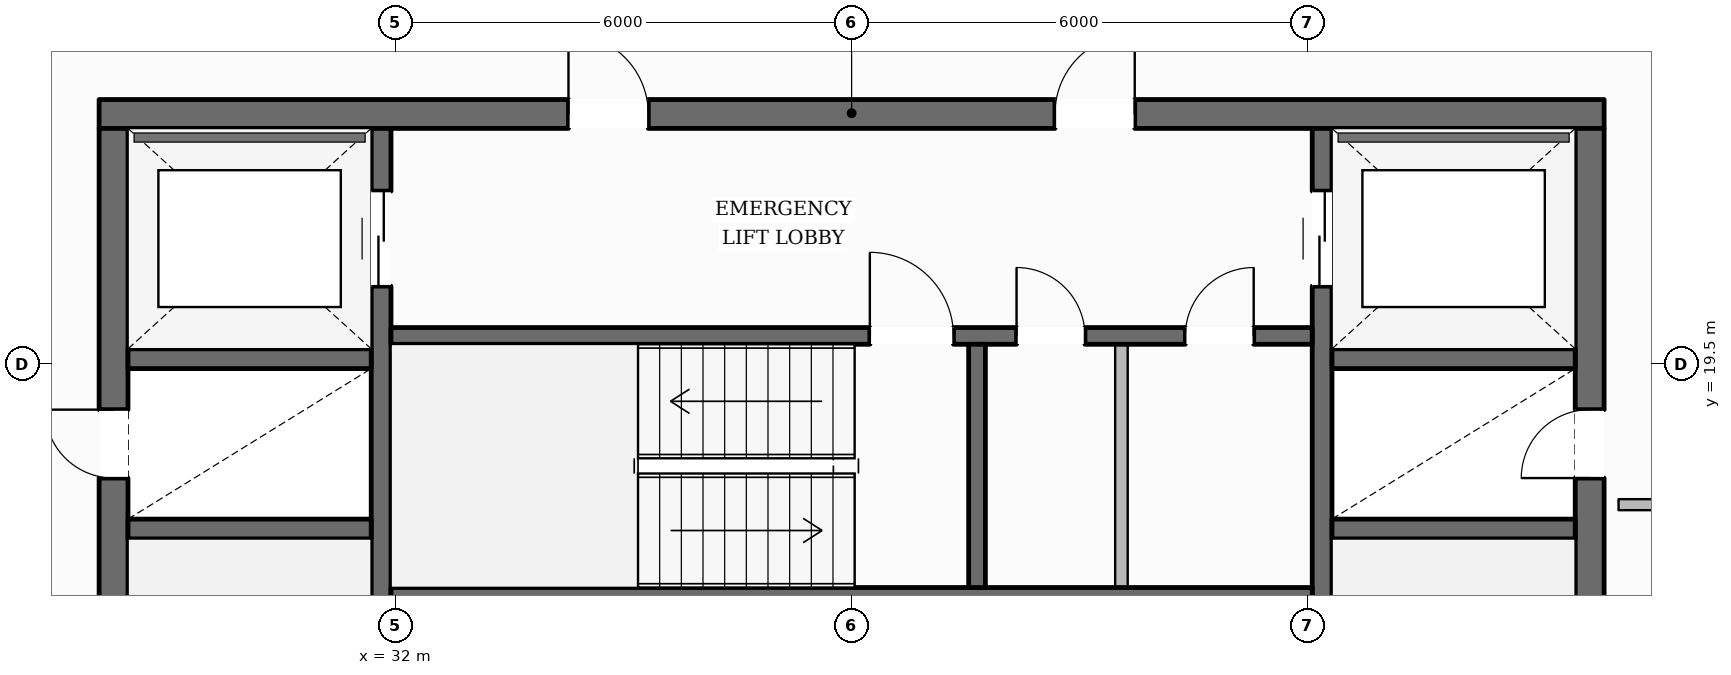
"""IFC4 building model, lengths in metres.
Left out: names, types, materials, properties, quantities, classifications, styles, units other than length and angle.
Written with IfcOpenShell. Run it as: python <this file> out.ifc"""

import sys

from ifc_helpers import new_model, si_unit, direction, frame, frame_2d, origin, place, context, subcontext, project, spatial, rectangle, extrude, element, fill, save


model = new_model("IFC4")
c1 = context("Model", 3, precision=1e-05, world=origin(), true_north=direction((0.0, 1.0)))
c2 = subcontext(c1, "Body", "Model", "MODEL_VIEW")
j1 = project(units=[si_unit("LENGTHUNIT", "METRE"), si_unit("PLANEANGLEUNIT", "RADIAN")], contexts=[c1])
p1 = place(None, origin())
s1 = spatial("IfcSite", under=j1, at=p1, CompositionType="ELEMENT")
p2 = place(p1, origin())
s2 = spatial("IfcBuilding", under=s1, at=p2, CompositionType="ELEMENT")
p3 = place(p2, frame((0.0, 0.0, 289.55)))
s3 = spatial("IfcBuildingStorey", under=s2, at=p3, CompositionType="ELEMENT", Elevation=289.55)
p4 = place(p3, frame((28.1, 22.79, 0.0), z_axis=(0.0, 0.0, 1.0), x_axis=(1.0, 0.0, 0.0)))
e1 = element("IfcWall", 1, at=p4, inside=s3, PredefinedType="SOLIDWALL", context=c2, shape_type="SweptSolid", body=[
    extrude(rectangle(XDim=19.8, YDim=0.38, at=frame_2d((9.9, 0.0))), origin(), (0.0, 0.0, 1.0), 3.61),
])
p5 = place(p4, frame((6.175, 0.0, 0.0)))
e2 = element("IfcOpeningElement", 2, at=p5, cuts=e1, PredefinedType="OPENING", context=c2, shape_type="SweptSolid", body=[
    extrude(rectangle(XDim=1.05, YDim=2.15, at=frame_2d((0.525, 1.075))), frame((0.0, 0.2, 0.0), z_axis=(0.0, -1.0, 0.0), x_axis=(1.0, 0.0, 0.0)), (0.0, 0.0, 1.0), 0.4),
])
p6 = place(p4, frame((12.575, 0.0, 0.0)))
e3 = element("IfcOpeningElement", 3, at=p6, cuts=e1, PredefinedType="OPENING", context=c2, shape_type="SweptSolid", body=[
    extrude(rectangle(XDim=1.05, YDim=2.15, at=frame_2d((0.525, 1.075))), frame((0.0, 0.2, 0.0), z_axis=(0.0, -1.0, 0.0), x_axis=(1.0, 0.0, 0.0)), (0.0, 0.0, 1.0), 0.4),
])
p7 = place(p3, frame((28.29, 9.6, 0.0), z_axis=(0.0, 0.0, 1.0), x_axis=(0.0, 1.0, 0.0)))
e4 = element("IfcWall", 4, at=p7, inside=s3, PredefinedType="SOLIDWALL", context=c2, shape_type="SweptSolid", body=[
    extrude(rectangle(XDim=13.0, YDim=0.38, at=frame_2d((6.5, 0.0))), origin(), (0.0, 0.0, 1.0), 3.61),
])
p8 = place(p7, frame((0.2, 0.0, 0.0)))
e5 = element("IfcOpeningElement", 5, at=p8, cuts=e4, PredefinedType="OPENING", context=c2, shape_type="SweptSolid", body=[
    extrude(rectangle(XDim=1.1, YDim=2.15, at=frame_2d((0.55, 1.075))), frame((0.0, 0.2, 0.0), z_axis=(0.0, -1.0, 0.0), x_axis=(1.0, 0.0, 0.0)), (0.0, 0.0, 1.0), 0.4),
])
p9 = place(p7, frame((8.4, 0.0, 0.0)))
e6 = element("IfcOpeningElement", 6, at=p9, cuts=e4, PredefinedType="OPENING", context=c2, shape_type="SweptSolid", body=[
    extrude(rectangle(XDim=0.9, YDim=2.1, at=frame_2d((0.45, 1.05))), frame((0.0, 0.2, 0.0), z_axis=(0.0, -1.0, 0.0), x_axis=(1.0, 0.0, 0.0)), (0.0, 0.0, 1.0), 0.4),
])
p10 = place(p3, frame((47.71, 9.6, 0.0), z_axis=(0.0, 0.0, 1.0), x_axis=(0.0, 1.0, 0.0)))
e7 = element("IfcWall", 7, at=p10, inside=s3, PredefinedType="SOLIDWALL", context=c2, shape_type="SweptSolid", body=[
    extrude(rectangle(XDim=13.0, YDim=0.38, at=frame_2d((6.5, 0.0))), origin(), (0.0, 0.0, 1.0), 3.61),
])
p11 = place(p10, frame((0.2, 0.0, 0.0)))
e8 = element("IfcOpeningElement", 8, at=p11, cuts=e7, PredefinedType="OPENING", context=c2, shape_type="SweptSolid", body=[
    extrude(rectangle(XDim=1.1, YDim=2.15, at=frame_2d((0.55, 1.075))), frame((0.0, 0.2, 0.0), z_axis=(0.0, -1.0, 0.0), x_axis=(1.0, 0.0, 0.0)), (0.0, 0.0, 1.0), 0.4),
])
p12 = place(p10, frame((8.4, 0.0, 0.0)))
e9 = element("IfcOpeningElement", 9, at=p12, cuts=e7, PredefinedType="OPENING", context=c2, shape_type="SweptSolid", body=[
    extrude(rectangle(XDim=0.9, YDim=2.1, at=frame_2d((0.45, 1.05))), frame((0.0, 0.2, 0.0), z_axis=(0.0, -1.0, 0.0), x_axis=(1.0, 0.0, 0.0)), (0.0, 0.0, 1.0), 0.4),
])
p13 = place(p3, frame((31.81, 9.6, 0.0), z_axis=(0.0, 0.0, 1.0), x_axis=(0.0, 1.0, 0.0)))
e10 = element("IfcWall", 10, at=p13, inside=s3, PredefinedType="SHEAR", context=c2, shape_type="SweptSolid", body=[
    extrude(rectangle(XDim=13.0, YDim=0.26, at=frame_2d((6.5, 0.0))), origin(), (0.0, 0.0, 1.0), 3.61),
])
p14 = place(p13, frame((10.925, 0.0, 0.0)))
e11 = element("IfcOpeningElement", 11, at=p14, cuts=e10, PredefinedType="OPENING", context=c2, shape_type="SweptSolid", body=[
    extrude(rectangle(XDim=1.25, YDim=2.25, at=frame_2d((0.625, 1.125))), frame((0.0, 0.14, 0.0), z_axis=(0.0, -1.0, 0.0), x_axis=(1.0, 0.0, 0.0)), (0.0, 0.0, 1.0), 0.28),
])
p15 = place(p3, frame((44.19, 9.6, 0.0), z_axis=(0.0, 0.0, 1.0), x_axis=(0.0, 1.0, 0.0)))
e12 = element("IfcWall", 12, at=p15, inside=s3, PredefinedType="SHEAR", context=c2, shape_type="SweptSolid", body=[
    extrude(rectangle(XDim=13.0, YDim=0.26, at=frame_2d((6.5, 0.0))), origin(), (0.0, 0.0, 1.0), 3.61),
])
p16 = place(p15, frame((10.925, 0.0, 0.0)))
e13 = element("IfcOpeningElement", 13, at=p16, cuts=e12, PredefinedType="OPENING", context=c2, shape_type="SweptSolid", body=[
    extrude(rectangle(XDim=1.25, YDim=2.25, at=frame_2d((0.625, 1.125))), frame((0.0, 0.14, 0.0), z_axis=(0.0, -1.0, 0.0), x_axis=(1.0, 0.0, 0.0)), (0.0, 0.0, 1.0), 0.28),
])
for number, where, z_axis, x_axis in (
    (14, (28.48, 17.33, 0.0), (0.0, 0.0, 1.0), (1.0, 0.0, 0.0)),
    (15, (28.48, 19.57, 0.0), (0.0, 0.0, 1.0), (1.0, 0.0, 0.0)),
    (16, (44.32, 17.33, 0.0), (0.0, 0.0, 1.0), (1.0, 0.0, 0.0)),
    (17, (44.32, 19.57, 0.0), (0.0, 0.0, 1.0), (1.0, 0.0, 0.0)),
):
    element("IfcWall", number, at=place(p3, frame(where, z_axis=z_axis, x_axis=x_axis)), inside=s3, PredefinedType="SHEAR", context=c2, shape_type="SweptSolid", body=[
        extrude(rectangle(XDim=3.2, YDim=0.26, at=frame_2d((1.6, 0.0))), origin(), (0.0, 0.0, 1.0), 3.61),
    ])
p17 = place(p3, frame((31.94, 19.87, 0.0), z_axis=(0.0, 0.0, 1.0), x_axis=(1.0, 0.0, 0.0)))
e18 = element("IfcWall", 18, at=p17, inside=s3, PredefinedType="SOLIDWALL", context=c2, shape_type="SweptSolid", body=[
    extrude(rectangle(XDim=12.12, YDim=0.22, at=frame_2d((6.06, 0.0))), origin(), (0.0, 0.0, 1.0), 3.61),
])
p18 = place(p17, frame((6.3, 0.0, 0.0)))
e19 = element("IfcOpeningElement", 19, at=p18, cuts=e18, PredefinedType="OPENING", context=c2, shape_type="SweptSolid", body=[
    extrude(rectangle(XDim=1.1, YDim=2.15, at=frame_2d((0.55, 1.075))), frame((0.0, 0.12, 0.0), z_axis=(0.0, -1.0, 0.0), x_axis=(1.0, 0.0, 0.0)), (0.0, 0.0, 1.0), 0.24),
])
p19 = place(p17, frame((8.23, 0.0, 0.0)))
e20 = element("IfcOpeningElement", 20, at=p19, cuts=e18, PredefinedType="OPENING", context=c2, shape_type="SweptSolid", body=[
    extrude(rectangle(XDim=0.9, YDim=2.1, at=frame_2d((0.45, 1.05))), frame((0.0, 0.12, 0.0), z_axis=(0.0, -1.0, 0.0), x_axis=(1.0, 0.0, 0.0)), (0.0, 0.0, 1.0), 0.24),
])
p20 = place(p17, frame((10.45, 0.0, 0.0)))
e21 = element("IfcOpeningElement", 21, at=p20, cuts=e18, PredefinedType="OPENING", context=c2, shape_type="SweptSolid", body=[
    extrude(rectangle(XDim=0.9, YDim=2.1, at=frame_2d((0.45, 1.05))), frame((0.0, 0.12, 0.0), z_axis=(0.0, -1.0, 0.0), x_axis=(1.0, 0.0, 0.0)), (0.0, 0.0, 1.0), 0.24),
])
p21 = place(p3, frame((31.94, 16.45, 0.0), z_axis=(0.0, 0.0, 1.0), x_axis=(1.0, 0.0, 0.0)))
e22 = element("IfcWall", 22, at=p21, inside=s3, PredefinedType="SOLIDWALL", context=c2, shape_type="SweptSolid", body=[
    extrude(rectangle(XDim=12.12, YDim=0.22, at=frame_2d((6.06, 0.0))), origin(), (0.0, 0.0, 1.0), 3.61),
])
p22 = place(p3, frame((39.65, 16.56, 0.0), z_axis=(0.0, 0.0, 1.0), x_axis=(0.0, 1.0, 0.0)))
e23 = element("IfcWall", 23, at=p22, inside=s3, PredefinedType="SOLIDWALL", context=c2, shape_type="SweptSolid", body=[
    extrude(rectangle(XDim=3.2, YDim=0.22, at=frame_2d((1.6, 0.0))), origin(), (0.0, 0.0, 1.0), 3.61),
])
p23 = place(p3, frame((15.251, 10.013, 0.0), z_axis=(0.0, 0.0, 1.0), x_axis=(0.505125442866, 0.863045935608, 0.0)))
e24 = element("IfcWall", 24, at=p23, inside=s3, PredefinedType="STANDARD", context=c2, shape_type="SweptSolid", body=[
    extrude(rectangle(XDim=39.517, YDim=0.35, at=frame_2d((19.759, 0.0))), origin(), (0.0, 0.0, 1.0), 3.196),
])
p24 = place(p23, frame((35.157, 0.0, 0.65)))
e25 = element("IfcOpeningElement", 25, at=p24, cuts=e24, PredefinedType="OPENING", context=c2, shape_type="SweptSolid", body=[
    extrude(rectangle(XDim=1.35, YDim=1.75, at=frame_2d((0.675, 0.875))), frame((0.0, 0.185, 0.0), z_axis=(0.0, -1.0, 0.0), x_axis=(1.0, 0.0, 0.0)), (0.0, 0.0, 1.0), 0.37),
])
p25 = place(p23, frame((28.729, 0.0, 0.65)))
e26 = element("IfcOpeningElement", 26, at=p25, cuts=e24, PredefinedType="OPENING", context=c2, shape_type="SweptSolid", body=[
    extrude(rectangle(XDim=1.35, YDim=1.75, at=frame_2d((0.675, 0.875))), frame((0.0, 0.185, 0.0), z_axis=(0.0, -1.0, 0.0), x_axis=(1.0, 0.0, 0.0)), (0.0, 0.0, 1.0), 0.37),
])
p26 = place(p23, frame((15.872, 0.0, 0.65)))
e27 = element("IfcOpeningElement", 27, at=p26, cuts=e24, PredefinedType="OPENING", context=c2, shape_type="SweptSolid", body=[
    extrude(rectangle(XDim=1.35, YDim=1.75, at=frame_2d((0.675, 0.875))), frame((0.0, 0.185, 0.0), z_axis=(0.0, -1.0, 0.0), x_axis=(1.0, 0.0, 0.0)), (0.0, 0.0, 1.0), 0.37),
])
p27 = place(p23, frame((9.444, 0.0, 0.65)))
e28 = element("IfcOpeningElement", 28, at=p27, cuts=e24, PredefinedType="OPENING", context=c2, shape_type="SweptSolid", body=[
    extrude(rectangle(XDim=1.35, YDim=1.75, at=frame_2d((0.675, 0.875))), frame((0.0, 0.185, 0.0), z_axis=(0.0, -1.0, 0.0), x_axis=(1.0, 0.0, 0.0)), (0.0, 0.0, 1.0), 0.37),
])
p28 = place(p23, frame((3.016, 0.0, 0.65)))
e29 = element("IfcOpeningElement", 29, at=p28, cuts=e24, PredefinedType="OPENING", context=c2, shape_type="SweptSolid", body=[
    extrude(rectangle(XDim=1.35, YDim=1.75, at=frame_2d((0.675, 0.875))), frame((0.0, 0.185, 0.0), z_axis=(0.0, -1.0, 0.0), x_axis=(1.0, 0.0, 0.0)), (0.0, 0.0, 1.0), 0.37),
])
p29 = place(p3, frame((40.664, 44.194, 0.0), z_axis=(0.0, 0.0, 1.0), x_axis=(0.494747407388, -0.869036824814, 0.0)))
e30 = element("IfcWall", 30, at=p29, inside=s3, PredefinedType="STANDARD", context=c2, shape_type="SweptSolid", body=[
    extrude(rectangle(XDim=38.713, YDim=0.35, at=frame_2d((19.357, 0.0))), origin(), (0.0, 0.0, 1.0), 3.196),
])
p30 = place(p29, frame((34.415, 0.0, 0.65)))
e31 = element("IfcOpeningElement", 31, at=p30, cuts=e30, PredefinedType="OPENING", context=c2, shape_type="SweptSolid", body=[
    extrude(rectangle(XDim=1.35, YDim=1.75, at=frame_2d((0.675, 0.875))), frame((0.0, 0.185, 0.0), z_axis=(0.0, -1.0, 0.0), x_axis=(1.0, 0.0, 0.0)), (0.0, 0.0, 1.0), 0.37),
])
p31 = place(p29, frame((28.123, 0.0, 0.65)))
e32 = element("IfcOpeningElement", 32, at=p31, cuts=e30, PredefinedType="OPENING", context=c2, shape_type="SweptSolid", body=[
    extrude(rectangle(XDim=1.35, YDim=1.75, at=frame_2d((0.675, 0.875))), frame((0.0, 0.185, 0.0), z_axis=(0.0, -1.0, 0.0), x_axis=(1.0, 0.0, 0.0)), (0.0, 0.0, 1.0), 0.37),
])
p32 = place(p29, frame((15.539, 0.0, 0.65)))
e33 = element("IfcOpeningElement", 33, at=p32, cuts=e30, PredefinedType="OPENING", context=c2, shape_type="SweptSolid", body=[
    extrude(rectangle(XDim=1.35, YDim=1.75, at=frame_2d((0.675, 0.875))), frame((0.0, 0.185, 0.0), z_axis=(0.0, -1.0, 0.0), x_axis=(1.0, 0.0, 0.0)), (0.0, 0.0, 1.0), 0.37),
])
p33 = place(p29, frame((9.246, 0.0, 0.65)))
e34 = element("IfcOpeningElement", 34, at=p33, cuts=e30, PredefinedType="OPENING", context=c2, shape_type="SweptSolid", body=[
    extrude(rectangle(XDim=1.35, YDim=1.75, at=frame_2d((0.675, 0.875))), frame((0.0, 0.185, 0.0), z_axis=(0.0, -1.0, 0.0), x_axis=(1.0, 0.0, 0.0)), (0.0, 0.0, 1.0), 0.37),
])
p34 = place(p29, frame((2.954, 0.0, 0.65)))
e35 = element("IfcOpeningElement", 35, at=p34, cuts=e30, PredefinedType="OPENING", context=c2, shape_type="SweptSolid", body=[
    extrude(rectangle(XDim=1.35, YDim=1.75, at=frame_2d((0.675, 0.875))), frame((0.0, 0.185, 0.0), z_axis=(0.0, -1.0, 0.0), x_axis=(1.0, 0.0, 0.0)), (0.0, 0.0, 1.0), 0.37),
])
p35 = place(p3, frame((41.55, 16.56, 0.0), z_axis=(0.0, 0.0, 1.0), x_axis=(0.0, 1.0, 0.0)))
e36 = element("IfcWall", 36, at=p35, inside=s3, PredefinedType="PARTITIONING", context=c2, shape_type="SweptSolid", body=[
    extrude(rectangle(XDim=3.2, YDim=0.165, at=frame_2d((1.6, 0.0))), origin(), (0.0, 0.0, 1.0), 3.61),
])
p36 = place(p3, frame((49.91, 17.65, 0.0), z_axis=(0.0, 0.0, 1.0), x_axis=(-1.0, 0.0, 0.0)))
e37 = element("IfcWall", 37, at=p36, inside=s3, PredefinedType="PARTITIONING", context=c2, shape_type="SweptSolid", body=[
    extrude(rectangle(XDim=1.82, YDim=0.145, at=frame_2d((0.91, 0.0))), origin(), (0.0, 0.0, 1.0), 3.61),
])
p37 = place(p18, origin())
e38 = element("IfcDoor", 38, at=p37, inside=s3, OperationType="SINGLE_SWING_LEFT", PredefinedType="DOOR", context=c2, shape_type="SweptSolid", body=[
    extrude(rectangle(XDim=1.1, YDim=2.15, at=frame_2d((0.55, 1.075))), frame((0.0, 0.025, 0.0), z_axis=(0.0, -1.0, 0.0), x_axis=(1.0, 0.0, 0.0)), (0.0, 0.0, 1.0), 0.05),
])
fill(e19, e38)
p38 = place(p9, origin())
e39 = element("IfcDoor", 39, at=p38, inside=s3, OperationType="SINGLE_SWING_RIGHT", PredefinedType="DOOR", context=c2, shape_type="SweptSolid", body=[
    extrude(rectangle(XDim=0.9, YDim=2.1, at=frame_2d((0.45, 1.05))), frame((0.0, 0.025, 0.0), z_axis=(0.0, -1.0, 0.0), x_axis=(1.0, 0.0, 0.0)), (0.0, 0.0, 1.0), 0.05),
])
fill(e6, e39)
p39 = place(p12, origin())
e40 = element("IfcDoor", 40, at=p39, inside=s3, OperationType="SINGLE_SWING_LEFT", PredefinedType="DOOR", context=c2, shape_type="SweptSolid", body=[
    extrude(rectangle(XDim=0.9, YDim=2.1, at=frame_2d((0.45, 1.05))), frame((0.0, 0.025, 0.0), z_axis=(0.0, -1.0, 0.0), x_axis=(1.0, 0.0, 0.0)), (0.0, 0.0, 1.0), 0.05),
])
fill(e9, e40)
p40 = place(p5, origin())
e41 = element("IfcDoor", 41, at=p40, inside=s3, OperationType="SINGLE_SWING_LEFT", PredefinedType="DOOR", context=c2, shape_type="SweptSolid", body=[
    extrude(rectangle(XDim=1.05, YDim=2.15, at=frame_2d((0.525, 1.075))), frame((0.0, 0.025, 0.0), z_axis=(0.0, -1.0, 0.0), x_axis=(1.0, 0.0, 0.0)), (0.0, 0.0, 1.0), 0.05),
])
fill(e2, e41)
p41 = place(p6, origin())
e42 = element("IfcDoor", 42, at=p41, inside=s3, OperationType="SINGLE_SWING_RIGHT", PredefinedType="DOOR", context=c2, shape_type="SweptSolid", body=[
    extrude(rectangle(XDim=1.05, YDim=2.15, at=frame_2d((0.525, 1.075))), frame((0.0, 0.025, 0.0), z_axis=(0.0, -1.0, 0.0), x_axis=(1.0, 0.0, 0.0)), (0.0, 0.0, 1.0), 0.05),
])
fill(e3, e42)
p42 = place(p14, origin())
e43 = element("IfcDoor", 43, at=p42, inside=s3, OperationType="DOUBLE_DOOR_SLIDING", PredefinedType="DOOR", context=c2, shape_type="SweptSolid", body=[
    extrude(rectangle(XDim=1.25, YDim=2.25, at=frame_2d((0.625, 1.125))), frame((0.0, 0.025, 0.0), z_axis=(0.0, -1.0, 0.0), x_axis=(1.0, 0.0, 0.0)), (0.0, 0.0, 1.0), 0.05),
])
fill(e11, e43)
p43 = place(p16, origin())
e44 = element("IfcDoor", 44, at=p43, inside=s3, OperationType="DOUBLE_DOOR_SLIDING", PredefinedType="DOOR", context=c2, shape_type="SweptSolid", body=[
    extrude(rectangle(XDim=1.25, YDim=2.25, at=frame_2d((0.625, 1.125))), frame((0.0, 0.025, 0.0), z_axis=(0.0, -1.0, 0.0), x_axis=(1.0, 0.0, 0.0)), (0.0, 0.0, 1.0), 0.05),
])
fill(e13, e44)
p44 = place(p19, origin())
e45 = element("IfcDoor", 45, at=p44, inside=s3, OperationType="SINGLE_SWING_LEFT", PredefinedType="DOOR", context=c2, shape_type="SweptSolid", body=[
    extrude(rectangle(XDim=0.9, YDim=2.1, at=frame_2d((0.45, 1.05))), frame((0.0, 0.025, 0.0), z_axis=(0.0, -1.0, 0.0), x_axis=(1.0, 0.0, 0.0)), (0.0, 0.0, 1.0), 0.05),
])
fill(e20, e45)
p45 = place(p20, origin())
e46 = element("IfcDoor", 46, at=p45, inside=s3, OperationType="SINGLE_SWING_RIGHT", PredefinedType="DOOR", context=c2, shape_type="SweptSolid", body=[
    extrude(rectangle(XDim=0.9, YDim=2.1, at=frame_2d((0.45, 1.05))), frame((0.0, 0.025, 0.0), z_axis=(0.0, -1.0, 0.0), x_axis=(1.0, 0.0, 0.0)), (0.0, 0.0, 1.0), 0.05),
])
fill(e21, e46)
save(model, sys.argv[1])
